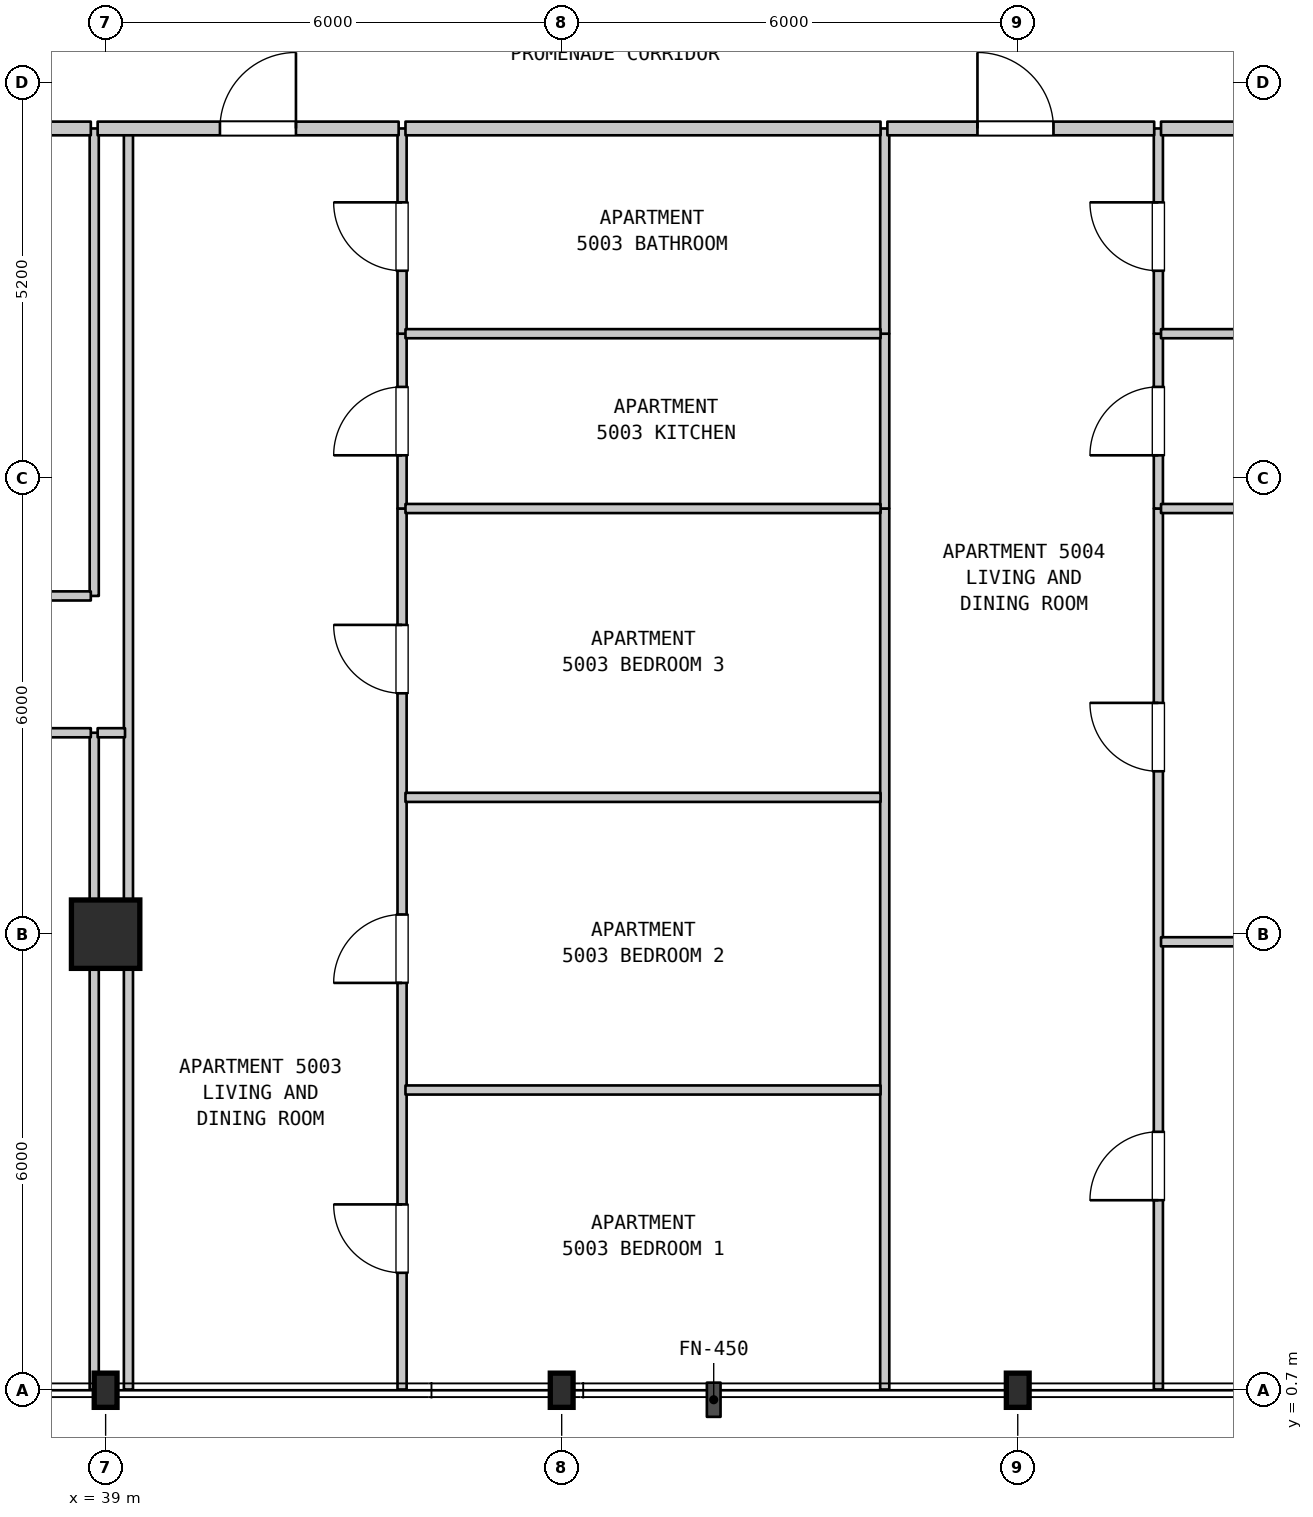
"""IFC4 building model, lengths in metres.
Left out: names, types, materials, properties, quantities, classifications, styles, units other than length and angle.
Written with IfcOpenShell. Run it as: python <this file> out.ifc"""

import sys

from ifc_helpers import new_model, si_unit, direction, frame, frame_2d, origin, origin_2d, place, context, subcontext, project, spatial, rectangle, i_section, extrude, element, fill, save


model = new_model("IFC4")
c1 = context("Model", 3, precision=1e-05, world=origin(), true_north=direction((0.0, 1.0)))
c2 = subcontext(c1, "Body", "Model", "MODEL_VIEW")
j1 = project(units=[si_unit("LENGTHUNIT", "METRE"), si_unit("PLANEANGLEUNIT", "RADIAN")], contexts=[c1])
p1 = place(None, origin())
s1 = spatial("IfcSite", under=j1, at=p1, CompositionType="ELEMENT")
p2 = place(p1, origin())
s2 = spatial("IfcBuilding", under=s1, at=p2, CompositionType="ELEMENT")
p3 = place(p2, frame((0.0, 0.0, 203.2)))
s3 = spatial("IfcBuildingStorey", under=s2, at=p3, CompositionType="ELEMENT", Elevation=203.2)
p4 = place(p3, frame((39.0, 0.7, 0.0), z_axis=(0.0, 0.0, 1.0), x_axis=(1.0, 0.0, 0.0)))
e1 = element("IfcColumn", 1, at=p4, inside=s3, PredefinedType="COLUMN", context=c2, shape_type="SweptSolid", body=[
    extrude(i_section(OverallWidth=0.3, OverallDepth=0.45, WebThickness=0.014, FlangeThickness=0.026, FilletRadius=0.027, at=origin_2d()), origin(), (0.0, 0.0, 1.0), 3.7),
])
p5 = place(p3, frame((39.0, 6.7, 0.0), z_axis=(0.0, 0.0, 1.0), x_axis=(1.0, 0.0, 0.0)))
e2 = element("IfcColumn", 2, at=p5, inside=s3, PredefinedType="COLUMN", context=c2, shape_type="SweptSolid", body=[
    extrude(rectangle(XDim=0.9, YDim=0.9, at=origin_2d()), origin(), (0.0, 0.0, 1.0), 3.7),
])
for number, where, z_axis, x_axis in (
    (3, (45.0, 0.7, 0.0), (0.0, 0.0, 1.0), (1.0, 0.0, 0.0)),
    (4, (51.0, 0.7, 0.0), (0.0, 0.0, 1.0), (1.0, 0.0, 0.0)),
):
    element("IfcColumn", number, at=place(p3, frame(where, z_axis=z_axis, x_axis=x_axis)), inside=s3, PredefinedType="COLUMN", context=c2, shape_type="SweptSolid", body=[
        extrude(i_section(OverallWidth=0.3, OverallDepth=0.45, WebThickness=0.014, FlangeThickness=0.026, FilletRadius=0.027, at=origin_2d()), origin(), (0.0, 0.0, 1.0), 3.7),
    ])
p6 = place(p3, frame((38.85, 0.71, 0.0), z_axis=(0.0, 0.0, 1.0), x_axis=(0.0, 1.0, 0.0)))
e5 = element("IfcWall", 5, at=p6, inside=s3, PredefinedType="PARTITIONING", context=c2, shape_type="SweptSolid", body=[
    extrude(rectangle(XDim=8.64, YDim=0.12, at=frame_2d((4.32, 0.0))), origin(), (0.0, 0.0, 1.0), 3.39),
])
p7 = place(p3, frame((38.85, 11.15, 0.0), z_axis=(0.0, 0.0, 1.0), x_axis=(0.0, 1.0, 0.0)))
e6 = element("IfcWall", 6, at=p7, inside=s3, PredefinedType="PARTITIONING", context=c2, shape_type="SweptSolid", body=[
    extrude(rectangle(XDim=6.15, YDim=0.12, at=frame_2d((3.075, 0.0))), origin(), (0.0, 0.0, 1.0), 3.39),
])
p8 = place(p3, frame((39.3, 0.71, 0.0), z_axis=(0.0, 0.0, 1.0), x_axis=(0.0, 1.0, 0.0)))
e7 = element("IfcWall", 7, at=p8, inside=s3, PredefinedType="PARTITIONING", context=c2, shape_type="SweptSolid", body=[
    extrude(rectangle(XDim=16.59, YDim=0.12, at=frame_2d((8.295, 0.0))), origin(), (0.0, 0.0, 1.0), 3.39),
])
p9 = place(p3, frame((42.9, 0.71, 0.0), z_axis=(0.0, 0.0, 1.0), x_axis=(0.0, 1.0, 0.0)))
e8 = element("IfcWall", 8, at=p9, inside=s3, PredefinedType="PARTITIONING", context=c2, shape_type="SweptSolid", body=[
    extrude(rectangle(XDim=11.59, YDim=0.12, at=frame_2d((5.795, 0.0))), origin(), (0.0, 0.0, 1.0), 3.39),
])
p10 = place(p9, frame((1.535, 0.0, 0.0)))
e9 = element("IfcOpeningElement", 9, at=p10, cuts=e8, PredefinedType="OPENING", context=c2, shape_type="SweptSolid", body=[
    extrude(rectangle(XDim=0.9, YDim=2.15, at=frame_2d((0.45, 1.075))), frame((0.0, 0.07, 0.0), z_axis=(0.0, -1.0, 0.0), x_axis=(1.0, 0.0, 0.0)), (0.0, 0.0, 1.0), 0.14),
])
p11 = place(p9, frame((5.349, 0.0, 0.0)))
e10 = element("IfcOpeningElement", 10, at=p11, cuts=e8, PredefinedType="OPENING", context=c2, shape_type="SweptSolid", body=[
    extrude(rectangle(XDim=0.9, YDim=2.15, at=frame_2d((0.45, 1.075))), frame((0.0, 0.07, 0.0), z_axis=(0.0, -1.0, 0.0), x_axis=(1.0, 0.0, 0.0)), (0.0, 0.0, 1.0), 0.14),
])
p12 = place(p9, frame((9.159, 0.0, 0.0)))
e11 = element("IfcOpeningElement", 11, at=p12, cuts=e8, PredefinedType="OPENING", context=c2, shape_type="SweptSolid", body=[
    extrude(rectangle(XDim=0.9, YDim=2.15, at=frame_2d((0.45, 1.075))), frame((0.0, 0.07, 0.0), z_axis=(0.0, -1.0, 0.0), x_axis=(1.0, 0.0, 0.0)), (0.0, 0.0, 1.0), 0.14),
])
p13 = place(p3, frame((42.9, 12.3, 0.0), z_axis=(0.0, 0.0, 1.0), x_axis=(0.0, 1.0, 0.0)))
e12 = element("IfcWall", 12, at=p13, inside=s3, PredefinedType="PARTITIONING", context=c2, shape_type="SweptSolid", body=[
    extrude(rectangle(XDim=2.3, YDim=0.12, at=frame_2d((1.15, 0.0))), origin(), (0.0, 0.0, 1.0), 3.39),
])
p14 = place(p13, frame((0.7, 0.0, 0.0)))
e13 = element("IfcOpeningElement", 13, at=p14, cuts=e12, PredefinedType="OPENING", context=c2, shape_type="SweptSolid", body=[
    extrude(rectangle(XDim=0.9, YDim=2.15, at=frame_2d((0.45, 1.075))), frame((0.0, 0.07, 0.0), z_axis=(0.0, -1.0, 0.0), x_axis=(1.0, 0.0, 0.0)), (0.0, 0.0, 1.0), 0.14),
])
p15 = place(p3, frame((42.9, 14.6, 0.0), z_axis=(0.0, 0.0, 1.0), x_axis=(0.0, 1.0, 0.0)))
e14 = element("IfcWall", 14, at=p15, inside=s3, PredefinedType="PARTITIONING", context=c2, shape_type="SweptSolid", body=[
    extrude(rectangle(XDim=2.7, YDim=0.12, at=frame_2d((1.35, 0.0))), origin(), (0.0, 0.0, 1.0), 3.39),
])
p16 = place(p15, frame((0.828, 0.0, 0.0)))
e15 = element("IfcOpeningElement", 15, at=p16, cuts=e14, PredefinedType="OPENING", context=c2, shape_type="SweptSolid", body=[
    extrude(rectangle(XDim=0.9, YDim=2.1, at=frame_2d((0.45, 1.05))), frame((0.0, 0.07, 0.0), z_axis=(0.0, -1.0, 0.0), x_axis=(1.0, 0.0, 0.0)), (0.0, 0.0, 1.0), 0.14),
])
p17 = place(p3, frame((49.25, 0.71, 0.0), z_axis=(0.0, 0.0, 1.0), x_axis=(0.0, 1.0, 0.0)))
e16 = element("IfcWall", 16, at=p17, inside=s3, PredefinedType="PARTITIONING", context=c2, shape_type="SweptSolid", body=[
    extrude(rectangle(XDim=11.59, YDim=0.12, at=frame_2d((5.795, 0.0))), origin(), (0.0, 0.0, 1.0), 3.39),
])
p18 = place(p3, frame((49.25, 12.3, 0.0), z_axis=(0.0, 0.0, 1.0), x_axis=(0.0, 1.0, 0.0)))
e17 = element("IfcWall", 17, at=p18, inside=s3, PredefinedType="PARTITIONING", context=c2, shape_type="SweptSolid", body=[
    extrude(rectangle(XDim=2.3, YDim=0.12, at=frame_2d((1.15, 0.0))), origin(), (0.0, 0.0, 1.0), 3.39),
])
p19 = place(p3, frame((49.25, 14.6, 0.0), z_axis=(0.0, 0.0, 1.0), x_axis=(0.0, 1.0, 0.0)))
e18 = element("IfcWall", 18, at=p19, inside=s3, PredefinedType="PARTITIONING", context=c2, shape_type="SweptSolid", body=[
    extrude(rectangle(XDim=2.7, YDim=0.12, at=frame_2d((1.35, 0.0))), origin(), (0.0, 0.0, 1.0), 3.39),
])
p20 = place(p3, frame((52.85, 0.71, 0.0), z_axis=(0.0, 0.0, 1.0), x_axis=(0.0, 1.0, 0.0)))
e19 = element("IfcWall", 19, at=p20, inside=s3, PredefinedType="PARTITIONING", context=c2, shape_type="SweptSolid", body=[
    extrude(rectangle(XDim=11.59, YDim=0.12, at=frame_2d((5.795, 0.0))), origin(), (0.0, 0.0, 1.0), 3.39),
])
p21 = place(p20, frame((2.49, 0.0, 0.0)))
e20 = element("IfcOpeningElement", 20, at=p21, cuts=e19, PredefinedType="OPENING", context=c2, shape_type="SweptSolid", body=[
    extrude(rectangle(XDim=0.9, YDim=2.15, at=frame_2d((0.45, 1.075))), frame((0.0, 0.07, 0.0), z_axis=(0.0, -1.0, 0.0), x_axis=(1.0, 0.0, 0.0)), (0.0, 0.0, 1.0), 0.14),
])
p22 = place(p20, frame((8.133, 0.0, 0.0)))
e21 = element("IfcOpeningElement", 21, at=p22, cuts=e19, PredefinedType="OPENING", context=c2, shape_type="SweptSolid", body=[
    extrude(rectangle(XDim=0.9, YDim=2.15, at=frame_2d((0.45, 1.075))), frame((0.0, 0.07, 0.0), z_axis=(0.0, -1.0, 0.0), x_axis=(1.0, 0.0, 0.0)), (0.0, 0.0, 1.0), 0.14),
])
p23 = place(p3, frame((52.85, 12.3, 0.0), z_axis=(0.0, 0.0, 1.0), x_axis=(0.0, 1.0, 0.0)))
e22 = element("IfcWall", 22, at=p23, inside=s3, PredefinedType="PARTITIONING", context=c2, shape_type="SweptSolid", body=[
    extrude(rectangle(XDim=2.3, YDim=0.12, at=frame_2d((1.15, 0.0))), origin(), (0.0, 0.0, 1.0), 3.39),
])
p24 = place(p23, frame((0.7, 0.0, 0.0)))
e23 = element("IfcOpeningElement", 23, at=p24, cuts=e22, PredefinedType="OPENING", context=c2, shape_type="SweptSolid", body=[
    extrude(rectangle(XDim=0.9, YDim=2.15, at=frame_2d((0.45, 1.075))), frame((0.0, 0.07, 0.0), z_axis=(0.0, -1.0, 0.0), x_axis=(1.0, 0.0, 0.0)), (0.0, 0.0, 1.0), 0.14),
])
p25 = place(p3, frame((52.85, 14.6, 0.0), z_axis=(0.0, 0.0, 1.0), x_axis=(0.0, 1.0, 0.0)))
e24 = element("IfcWall", 24, at=p25, inside=s3, PredefinedType="PARTITIONING", context=c2, shape_type="SweptSolid", body=[
    extrude(rectangle(XDim=2.7, YDim=0.12, at=frame_2d((1.35, 0.0))), origin(), (0.0, 0.0, 1.0), 3.39),
])
p26 = place(p25, frame((0.828, 0.0, 0.0)))
e25 = element("IfcOpeningElement", 25, at=p26, cuts=e24, PredefinedType="OPENING", context=c2, shape_type="SweptSolid", body=[
    extrude(rectangle(XDim=0.9, YDim=2.1, at=frame_2d((0.45, 1.05))), frame((0.0, 0.07, 0.0), z_axis=(0.0, -1.0, 0.0), x_axis=(1.0, 0.0, 0.0)), (0.0, 0.0, 1.0), 0.14),
])
p27 = place(p3, frame((42.945, 4.65, 0.0), z_axis=(0.0, 0.0, 1.0), x_axis=(1.0, 0.0, 0.0)))
e26 = element("IfcWall", 26, at=p27, inside=s3, PredefinedType="PARTITIONING", context=c2, shape_type="SweptSolid", body=[
    extrude(rectangle(XDim=6.25, YDim=0.12, at=frame_2d((3.125, 0.0))), origin(), (0.0, 0.0, 1.0), 3.39),
])
p28 = place(p3, frame((52.885, 6.6, 0.0), z_axis=(0.0, 0.0, 1.0), x_axis=(1.0, 0.0, 0.0)))
e27 = element("IfcWall", 27, at=p28, inside=s3, PredefinedType="PARTITIONING", context=c2, shape_type="SweptSolid", body=[
    extrude(rectangle(XDim=4.105, YDim=0.12, at=frame_2d((2.052, 0.0))), origin(), (0.0, 0.0, 1.0), 2.79),
])
p29 = place(p3, frame((42.945, 8.5, 0.0), z_axis=(0.0, 0.0, 1.0), x_axis=(1.0, 0.0, 0.0)))
e28 = element("IfcWall", 28, at=p29, inside=s3, PredefinedType="PARTITIONING", context=c2, shape_type="SweptSolid", body=[
    extrude(rectangle(XDim=6.25, YDim=0.12, at=frame_2d((3.125, 0.0))), origin(), (0.0, 0.0, 1.0), 3.39),
])
p30 = place(p3, frame((32.185, 9.35, 0.0), z_axis=(0.0, 0.0, 1.0), x_axis=(1.0, 0.0, 0.0)))
e29 = element("IfcWall", 29, at=p30, inside=s3, PredefinedType="PARTITIONING", context=c2, shape_type="SweptSolid", body=[
    extrude(rectangle(XDim=6.62, YDim=0.12, at=frame_2d((3.31, 0.0))), origin(), (0.0, 0.0, 1.0), 3.39),
])
p31 = place(p30, frame((1.285, 0.0, 0.0)))
e30 = element("IfcOpeningElement", 30, at=p31, cuts=e29, PredefinedType="OPENING", context=c2, shape_type="SweptSolid", body=[
    extrude(rectangle(XDim=0.9, YDim=2.15, at=frame_2d((0.45, 1.075))), frame((0.0, 0.07, 0.0), z_axis=(0.0, -1.0, 0.0), x_axis=(1.0, 0.0, 0.0)), (0.0, 0.0, 1.0), 0.14),
])
p32 = place(p30, frame((4.29, 0.0, 0.0)))
e31 = element("IfcOpeningElement", 31, at=p32, cuts=e29, PredefinedType="OPENING", context=c2, shape_type="SweptSolid", body=[
    extrude(rectangle(XDim=0.9, YDim=2.15, at=frame_2d((0.45, 1.075))), frame((0.0, 0.07, 0.0), z_axis=(0.0, -1.0, 0.0), x_axis=(1.0, 0.0, 0.0)), (0.0, 0.0, 1.0), 0.14),
])
p33 = place(p3, frame((38.895, 9.35, 0.0), z_axis=(0.0, 0.0, 1.0), x_axis=(1.0, 0.0, 0.0)))
e32 = element("IfcWall", 32, at=p33, inside=s3, PredefinedType="PARTITIONING", context=c2, shape_type="SweptSolid", body=[
    extrude(rectangle(XDim=0.36, YDim=0.12, at=frame_2d((0.18, 0.0))), origin(), (0.0, 0.0, 1.0), 3.39),
])
p34 = place(p3, frame((35.272, 11.15, 0.0), z_axis=(0.0, 0.0, 1.0), x_axis=(1.0, 0.0, 0.0)))
e33 = element("IfcWall", 33, at=p34, inside=s3, PredefinedType="PARTITIONING", context=c2, shape_type="SweptSolid", body=[
    extrude(rectangle(XDim=3.533, YDim=0.12, at=frame_2d((1.767, 0.0))), origin(), (0.0, 0.0, 1.0), 3.39),
])
p35 = place(p34, frame((1.243, 0.0, 0.0)))
e34 = element("IfcOpeningElement", 34, at=p35, cuts=e33, PredefinedType="OPENING", context=c2, shape_type="SweptSolid", body=[
    extrude(rectangle(XDim=0.9, YDim=2.1, at=frame_2d((0.45, 1.05))), frame((0.0, 0.07, 0.0), z_axis=(0.0, -1.0, 0.0), x_axis=(1.0, 0.0, 0.0)), (0.0, 0.0, 1.0), 0.14),
])
p36 = place(p3, frame((42.945, 12.3, 0.0), z_axis=(0.0, 0.0, 1.0), x_axis=(1.0, 0.0, 0.0)))
e35 = element("IfcWall", 35, at=p36, inside=s3, PredefinedType="PARTITIONING", context=c2, shape_type="SweptSolid", body=[
    extrude(rectangle(XDim=6.25, YDim=0.12, at=frame_2d((3.125, 0.0))), origin(), (0.0, 0.0, 1.0), 3.39),
])
p37 = place(p3, frame((52.885, 12.3, 0.0), z_axis=(0.0, 0.0, 1.0), x_axis=(1.0, 0.0, 0.0)))
e36 = element("IfcWall", 36, at=p37, inside=s3, PredefinedType="PARTITIONING", context=c2, shape_type="SweptSolid", body=[
    extrude(rectangle(XDim=4.105, YDim=0.12, at=frame_2d((2.052, 0.0))), origin(), (0.0, 0.0, 1.0), 3.39),
])
p38 = place(p3, frame((42.945, 14.6, 0.0), z_axis=(0.0, 0.0, 1.0), x_axis=(1.0, 0.0, 0.0)))
e37 = element("IfcWall", 37, at=p38, inside=s3, PredefinedType="PARTITIONING", context=c2, shape_type="SweptSolid", body=[
    extrude(rectangle(XDim=6.25, YDim=0.12, at=frame_2d((3.125, 0.0))), origin(), (0.0, 0.0, 1.0), 3.39),
])
p39 = place(p3, frame((52.885, 14.6, 0.0), z_axis=(0.0, 0.0, 1.0), x_axis=(1.0, 0.0, 0.0)))
e38 = element("IfcWall", 38, at=p39, inside=s3, PredefinedType="PARTITIONING", context=c2, shape_type="SweptSolid", body=[
    extrude(rectangle(XDim=4.105, YDim=0.12, at=frame_2d((2.052, 0.0))), origin(), (0.0, 0.0, 1.0), 3.39),
])
p40 = place(p3, frame((35.272, 17.3, 0.0), z_axis=(0.0, 0.0, 1.0), x_axis=(1.0, 0.0, 0.0)))
e39 = element("IfcWall", 39, at=p40, inside=s3, PredefinedType="STANDARD", context=c2, shape_type="SweptSolid", body=[
    extrude(rectangle(XDim=3.533, YDim=0.18, at=frame_2d((1.767, 0.0))), origin(), (0.0, 0.0, 1.0), 3.39),
])
p41 = place(p3, frame((38.895, 17.3, 0.0), z_axis=(0.0, 0.0, 1.0), x_axis=(1.0, 0.0, 0.0)))
e40 = element("IfcWall", 40, at=p41, inside=s3, PredefinedType="STANDARD", context=c2, shape_type="SweptSolid", body=[
    extrude(rectangle(XDim=3.96, YDim=0.18, at=frame_2d((1.98, 0.0))), origin(), (0.0, 0.0, 1.0), 3.39),
])
p42 = place(p41, frame((1.609, 0.0, 0.0)))
e41 = element("IfcOpeningElement", 41, at=p42, cuts=e40, PredefinedType="OPENING", context=c2, shape_type="SweptSolid", body=[
    extrude(rectangle(XDim=1.0, YDim=2.15, at=frame_2d((0.5, 1.075))), frame((0.0, 0.1, 0.0), z_axis=(0.0, -1.0, 0.0), x_axis=(1.0, 0.0, 0.0)), (0.0, 0.0, 1.0), 0.2),
])
p43 = place(p3, frame((42.945, 17.3, 0.0), z_axis=(0.0, 0.0, 1.0), x_axis=(1.0, 0.0, 0.0)))
e42 = element("IfcWall", 42, at=p43, inside=s3, PredefinedType="STANDARD", context=c2, shape_type="SweptSolid", body=[
    extrude(rectangle(XDim=6.25, YDim=0.18, at=frame_2d((3.125, 0.0))), origin(), (0.0, 0.0, 1.0), 3.39),
])
p44 = place(p3, frame((49.285, 17.3, 0.0), z_axis=(0.0, 0.0, 1.0), x_axis=(1.0, 0.0, 0.0)))
e43 = element("IfcWall", 43, at=p44, inside=s3, PredefinedType="STANDARD", context=c2, shape_type="SweptSolid", body=[
    extrude(rectangle(XDim=3.51, YDim=0.18, at=frame_2d((1.755, 0.0))), origin(), (0.0, 0.0, 1.0), 3.39),
])
p45 = place(p44, frame((1.185, 0.0, 0.0)))
e44 = element("IfcOpeningElement", 44, at=p45, cuts=e43, PredefinedType="OPENING", context=c2, shape_type="SweptSolid", body=[
    extrude(rectangle(XDim=1.0, YDim=2.15, at=frame_2d((0.5, 1.075))), frame((0.0, 0.1, 0.0), z_axis=(0.0, -1.0, 0.0), x_axis=(1.0, 0.0, 0.0)), (0.0, 0.0, 1.0), 0.2),
])
p46 = place(p3, frame((52.885, 17.3, 0.0), z_axis=(0.0, 0.0, 1.0), x_axis=(1.0, 0.0, 0.0)))
e45 = element("IfcWall", 45, at=p46, inside=s3, PredefinedType="STANDARD", context=c2, shape_type="SweptSolid", body=[
    extrude(rectangle(XDim=1.695, YDim=0.18, at=frame_2d((0.848, 0.0))), origin(), (0.0, 0.0, 1.0), 3.39),
])
p47 = place(p10, origin())
e46 = element("IfcDoor", 46, at=p47, inside=s3, OperationType="SINGLE_SWING_RIGHT", PredefinedType="DOOR", context=c2, shape_type="SweptSolid", body=[
    extrude(rectangle(XDim=0.9, YDim=2.15, at=frame_2d((0.45, 1.075))), frame((0.0, 0.025, 0.0), z_axis=(0.0, -1.0, 0.0), x_axis=(1.0, 0.0, 0.0)), (0.0, 0.0, 1.0), 0.05),
])
fill(e9, e46)
p48 = place(p11, origin())
e47 = element("IfcDoor", 47, at=p48, inside=s3, OperationType="SINGLE_SWING_LEFT", PredefinedType="DOOR", context=c2, shape_type="SweptSolid", body=[
    extrude(rectangle(XDim=0.9, YDim=2.15, at=frame_2d((0.45, 1.075))), frame((0.0, 0.025, 0.0), z_axis=(0.0, -1.0, 0.0), x_axis=(1.0, 0.0, 0.0)), (0.0, 0.0, 1.0), 0.05),
])
fill(e10, e47)
p49 = place(p12, origin())
e48 = element("IfcDoor", 48, at=p49, inside=s3, OperationType="SINGLE_SWING_RIGHT", PredefinedType="DOOR", context=c2, shape_type="SweptSolid", body=[
    extrude(rectangle(XDim=0.9, YDim=2.15, at=frame_2d((0.45, 1.075))), frame((0.0, 0.025, 0.0), z_axis=(0.0, -1.0, 0.0), x_axis=(1.0, 0.0, 0.0)), (0.0, 0.0, 1.0), 0.05),
])
fill(e11, e48)
p50 = place(p14, origin())
e49 = element("IfcDoor", 49, at=p50, inside=s3, OperationType="SINGLE_SWING_LEFT", PredefinedType="DOOR", context=c2, shape_type="SweptSolid", body=[
    extrude(rectangle(XDim=0.9, YDim=2.15, at=frame_2d((0.45, 1.075))), frame((0.0, 0.025, 0.0), z_axis=(0.0, -1.0, 0.0), x_axis=(1.0, 0.0, 0.0)), (0.0, 0.0, 1.0), 0.05),
])
fill(e13, e49)
p51 = place(p16, origin())
e50 = element("IfcDoor", 50, at=p51, inside=s3, OperationType="SINGLE_SWING_RIGHT", PredefinedType="DOOR", context=c2, shape_type="SweptSolid", body=[
    extrude(rectangle(XDim=0.9, YDim=2.1, at=frame_2d((0.45, 1.05))), frame((0.0, 0.025, 0.0), z_axis=(0.0, -1.0, 0.0), x_axis=(1.0, 0.0, 0.0)), (0.0, 0.0, 1.0), 0.05),
])
fill(e15, e50)
p52 = place(p21, origin())
e51 = element("IfcDoor", 51, at=p52, inside=s3, OperationType="SINGLE_SWING_LEFT", PredefinedType="DOOR", context=c2, shape_type="SweptSolid", body=[
    extrude(rectangle(XDim=0.9, YDim=2.15, at=frame_2d((0.45, 1.075))), frame((0.0, 0.025, 0.0), z_axis=(0.0, -1.0, 0.0), x_axis=(1.0, 0.0, 0.0)), (0.0, 0.0, 1.0), 0.05),
])
fill(e20, e51)
p53 = place(p22, origin())
e52 = element("IfcDoor", 52, at=p53, inside=s3, OperationType="SINGLE_SWING_RIGHT", PredefinedType="DOOR", context=c2, shape_type="SweptSolid", body=[
    extrude(rectangle(XDim=0.9, YDim=2.15, at=frame_2d((0.45, 1.075))), frame((0.0, 0.025, 0.0), z_axis=(0.0, -1.0, 0.0), x_axis=(1.0, 0.0, 0.0)), (0.0, 0.0, 1.0), 0.05),
])
fill(e21, e52)
p54 = place(p24, origin())
e53 = element("IfcDoor", 53, at=p54, inside=s3, OperationType="SINGLE_SWING_LEFT", PredefinedType="DOOR", context=c2, shape_type="SweptSolid", body=[
    extrude(rectangle(XDim=0.9, YDim=2.15, at=frame_2d((0.45, 1.075))), frame((0.0, 0.025, 0.0), z_axis=(0.0, -1.0, 0.0), x_axis=(1.0, 0.0, 0.0)), (0.0, 0.0, 1.0), 0.05),
])
fill(e23, e53)
p55 = place(p26, origin())
e54 = element("IfcDoor", 54, at=p55, inside=s3, OperationType="SINGLE_SWING_RIGHT", PredefinedType="DOOR", context=c2, shape_type="SweptSolid", body=[
    extrude(rectangle(XDim=0.9, YDim=2.1, at=frame_2d((0.45, 1.05))), frame((0.0, 0.025, 0.0), z_axis=(0.0, -1.0, 0.0), x_axis=(1.0, 0.0, 0.0)), (0.0, 0.0, 1.0), 0.05),
])
fill(e25, e54)
p56 = place(p42, origin())
e55 = element("IfcDoor", 55, at=p56, inside=s3, OperationType="SINGLE_SWING_RIGHT", PredefinedType="DOOR", context=c2, shape_type="SweptSolid", body=[
    extrude(rectangle(XDim=1.0, YDim=2.15, at=frame_2d((0.5, 1.075))), frame((0.0, 0.025, 0.0), z_axis=(0.0, -1.0, 0.0), x_axis=(1.0, 0.0, 0.0)), (0.0, 0.0, 1.0), 0.05),
])
fill(e41, e55)
p57 = place(p45, origin())
e56 = element("IfcDoor", 56, at=p57, inside=s3, OperationType="SINGLE_SWING_LEFT", PredefinedType="DOOR", context=c2, shape_type="SweptSolid", body=[
    extrude(rectangle(XDim=1.0, YDim=2.15, at=frame_2d((0.5, 1.075))), frame((0.0, 0.025, 0.0), z_axis=(0.0, -1.0, 0.0), x_axis=(1.0, 0.0, 0.0)), (0.0, 0.0, 1.0), 0.05),
])
fill(e44, e56)
save(model, sys.argv[1])
